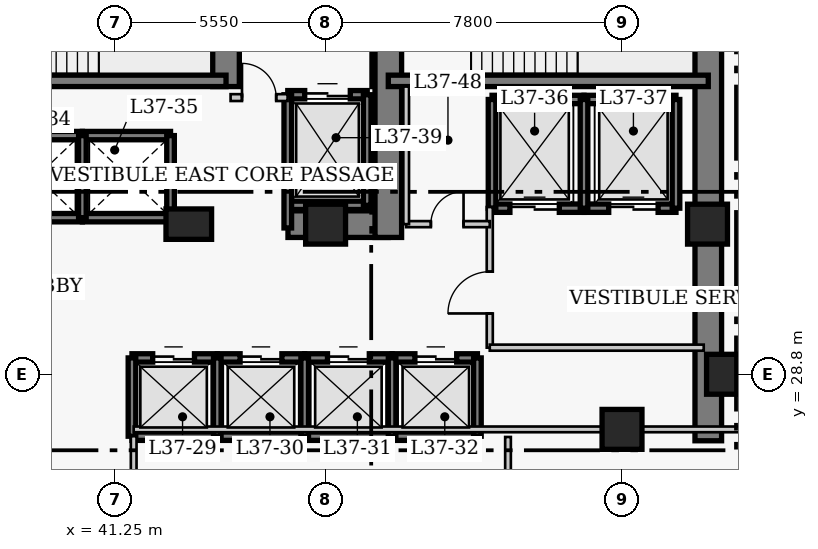
"""IFC4 building model, lengths in metres.
Left out: names, types, materials, properties, quantities, classifications, styles, units other than length and angle.
Written with IfcOpenShell. Run it as: python <this file> out.ifc"""

import sys

from ifc_helpers import new_model, si_unit, direction, frame, frame_2d, origin, origin_2d, place, context, subcontext, project, spatial, rectangle, extrude, element, fill, save


model = new_model("IFC4")
c1 = context("Model", 3, precision=1e-05, world=origin(), true_north=direction((0.0, 1.0)))
c2 = subcontext(c1, "Body", "Model", "MODEL_VIEW")
j1 = project(units=[si_unit("LENGTHUNIT", "METRE"), si_unit("PLANEANGLEUNIT", "RADIAN")], contexts=[c1])
p1 = place(None, origin())
s1 = spatial("IfcSite", under=j1, at=p1, CompositionType="ELEMENT")
p2 = place(p1, origin())
s2 = spatial("IfcBuilding", under=s1, at=p2, CompositionType="ELEMENT")
p3 = place(p2, frame((0.0, 0.0, 149.8)))
s3 = spatial("IfcBuildingStorey", under=s2, at=p3, CompositionType="ELEMENT", Elevation=149.8)
p4 = place(p3, frame((56.87, 27.05, 0.0), z_axis=(0.0, 0.0, 1.0), x_axis=(0.0, 1.0, 0.0)))
e1 = element("IfcWall", 1, at=p4, inside=s3, PredefinedType="SHEAR", context=c2, shape_type="SweptSolid", body=[
    extrude(rectangle(XDim=13.62, YDim=0.7, at=frame_2d((6.81, 0.0))), origin(), (0.0, 0.0, 1.0), 3.8),
])
p5 = place(p3, frame((45.81, 32.75, 0.0), z_axis=(0.0, 0.0, 1.0), x_axis=(1.0, 0.0, 0.0)))
e2 = element("IfcWall", 2, at=p5, inside=s3, PredefinedType="SHEAR", context=c2, shape_type="SweptSolid", body=[
    extrude(rectangle(XDim=2.64, YDim=0.7, at=frame_2d((1.32, 0.0))), origin(), (0.0, 0.0, 1.0), 3.8),
])
p6 = place(p3, frame((44.18, 36.37, 0.0), z_axis=(0.0, 0.0, 1.0), x_axis=(0.0, 1.0, 0.0)))
e3 = element("IfcWall", 3, at=p6, inside=s3, PredefinedType="SHEAR", context=c2, shape_type="SweptSolid", body=[
    extrude(rectangle(XDim=3.95, YDim=0.7, at=frame_2d((1.975, 0.0))), origin(), (0.0, 0.0, 1.0), 3.8),
])
p7 = place(p3, frame((48.45, 32.4, 0.0), z_axis=(0.0, 0.0, 1.0), x_axis=(0.0, 1.0, 0.0)))
e4 = element("IfcWall", 4, at=p7, inside=s3, PredefinedType="SHEAR", context=c2, shape_type="SweptSolid", body=[
    extrude(rectangle(XDim=7.92, YDim=0.7, at=frame_2d((3.96, 0.0))), origin(), (0.0, 0.0, 1.0), 3.8),
])
p8 = place(p7, frame((5.8, 0.0, 0.0)))
e5 = element("IfcOpeningElement", 5, at=p8, cuts=e4, PredefinedType="OPENING", context=c2, shape_type="SweptSolid", body=[
    extrude(rectangle(XDim=1.1, YDim=2.15, at=frame_2d((0.55, 1.075))), frame((0.0, 0.36, 0.0), z_axis=(0.0, -1.0, 0.0), x_axis=(1.0, 0.0, 0.0)), (0.0, 0.0, 1.0), 0.72),
])
p9 = place(p3, frame((35.85, 36.52, 0.0), z_axis=(0.0, 0.0, 1.0), x_axis=(1.0, 0.0, 0.0)))
e6 = element("IfcWall", 6, at=p9, inside=s3, PredefinedType="SHEAR", context=c2, shape_type="SweptSolid", body=[
    extrude(rectangle(XDim=8.33, YDim=0.3, at=frame_2d((4.165, 0.0))), origin(), (0.0, 0.0, 1.0), 3.8),
])
p10 = place(p3, frame((48.45, 36.52, 0.0), z_axis=(0.0, 0.0, 1.0), x_axis=(1.0, 0.0, 0.0)))
e7 = element("IfcWall", 7, at=p10, inside=s3, PredefinedType="SHEAR", context=c2, shape_type="SweptSolid", body=[
    extrude(rectangle(XDim=8.42, YDim=0.3, at=frame_2d((4.21, 0.0))), origin(), (0.0, 0.0, 1.0), 3.8),
])
p11 = place(p3, frame((57.35, 28.8, 0.0), z_axis=(0.0, 0.0, 1.0), x_axis=(1.0, 0.0, 0.0)))
e8 = element("IfcColumn", 8, at=p11, inside=s3, PredefinedType="COLUMN", context=c2, shape_type="SweptSolid", body=[
    extrude(rectangle(XDim=1.05, YDim=1.05, at=origin_2d()), origin(), (0.0, 0.0, 1.0), 3.8),
])
p12 = place(p3, frame((43.2, 32.75, 0.0), z_axis=(0.0, 0.0, 1.0), x_axis=(1.0, 0.0, 0.0)))
e9 = element("IfcColumn", 9, at=p12, inside=s3, PredefinedType="COLUMN", context=c2, shape_type="SweptSolid", body=[
    extrude(rectangle(XDim=1.2, YDim=0.8, at=origin_2d()), origin(), (0.0, 0.0, 1.0), 3.8),
])
for number, where, z_axis, x_axis in (
    (10, (46.8, 32.75, 0.0), (0.0, 0.0, 1.0), (1.0, 0.0, 0.0)),
    (11, (54.6, 27.35, 0.0), (0.0, 0.0, 1.0), (1.0, 0.0, 0.0)),
    (12, (56.85, 32.75, 0.0), (0.0, 0.0, 1.0), (1.0, 0.0, 0.0)),
):
    element("IfcColumn", number, at=place(p3, frame(where, z_axis=z_axis, x_axis=x_axis)), inside=s3, PredefinedType="COLUMN", context=c2, shape_type="SweptSolid", body=[
        extrude(rectangle(XDim=1.05, YDim=1.05, at=origin_2d()), origin(), (0.0, 0.0, 1.0), 3.8),
    ])
p13 = place(p3, frame((41.705, 29.23, 0.0), z_axis=(0.0, 0.0, 1.0), x_axis=(1.0, 0.0, 0.0)))
e13 = element("IfcWall", 13, at=p13, inside=s3, PredefinedType="SHEAR", context=c2, shape_type="SweptSolid", body=[
    extrude(rectangle(XDim=2.245, YDim=0.22, at=frame_2d((1.123, 0.0))), origin(), (0.0, 0.0, 1.0), 3.8),
])
p14 = place(p13, frame((0.545, 0.0, 0.0)))
e14 = element("IfcOpeningElement", 14, at=p14, cuts=e13, PredefinedType="OPENING", context=c2, shape_type="SweptSolid", body=[
    extrude(rectangle(XDim=1.1, YDim=2.15, at=frame_2d((0.55, 1.075))), frame((0.0, 0.12, 0.0), z_axis=(0.0, -1.0, 0.0), x_axis=(1.0, 0.0, 0.0)), (0.0, 0.0, 1.0), 0.24),
])
p15 = place(p3, frame((41.705, 27.17, 0.0), z_axis=(0.0, 0.0, 1.0), x_axis=(1.0, 0.0, 0.0)))
e15 = element("IfcWall", 15, at=p15, inside=s3, PredefinedType="SHEAR", context=c2, shape_type="SweptSolid", body=[
    extrude(rectangle(XDim=2.245, YDim=0.22, at=frame_2d((1.123, 0.0))), origin(), (0.0, 0.0, 1.0), 3.8),
])
p16 = place(p3, frame((41.705, 27.17, 0.0), z_axis=(0.0, 0.0, 1.0), x_axis=(0.0, 1.0, 0.0)))
e16 = element("IfcWall", 16, at=p16, inside=s3, PredefinedType="SHEAR", context=c2, shape_type="SweptSolid", body=[
    extrude(rectangle(XDim=2.06, YDim=0.2, at=frame_2d((1.03, 0.0))), origin(), (0.0, 0.0, 1.0), 3.8),
])
p17 = place(p3, frame((43.95, 29.23, 0.0), z_axis=(0.0, 0.0, 1.0), x_axis=(1.0, 0.0, 0.0)))
e17 = element("IfcWall", 17, at=p17, inside=s3, PredefinedType="SHEAR", context=c2, shape_type="SweptSolid", body=[
    extrude(rectangle(XDim=2.3, YDim=0.22, at=frame_2d((1.15, 0.0))), origin(), (0.0, 0.0, 1.0), 3.8),
])
p18 = place(p17, frame((0.6, 0.0, 0.0)))
e18 = element("IfcOpeningElement", 18, at=p18, cuts=e17, PredefinedType="OPENING", context=c2, shape_type="SweptSolid", body=[
    extrude(rectangle(XDim=1.1, YDim=2.15, at=frame_2d((0.55, 1.075))), frame((0.0, 0.12, 0.0), z_axis=(0.0, -1.0, 0.0), x_axis=(1.0, 0.0, 0.0)), (0.0, 0.0, 1.0), 0.24),
])
p19 = place(p3, frame((43.95, 27.17, 0.0), z_axis=(0.0, 0.0, 1.0), x_axis=(1.0, 0.0, 0.0)))
e19 = element("IfcWall", 19, at=p19, inside=s3, PredefinedType="SHEAR", context=c2, shape_type="SweptSolid", body=[
    extrude(rectangle(XDim=2.3, YDim=0.22, at=frame_2d((1.15, 0.0))), origin(), (0.0, 0.0, 1.0), 3.8),
])
p20 = place(p3, frame((43.95, 27.17, 0.0), z_axis=(0.0, 0.0, 1.0), x_axis=(0.0, 1.0, 0.0)))
e20 = element("IfcWall", 20, at=p20, inside=s3, PredefinedType="SHEAR", context=c2, shape_type="SweptSolid", body=[
    extrude(rectangle(XDim=2.06, YDim=0.2, at=frame_2d((1.03, 0.0))), origin(), (0.0, 0.0, 1.0), 3.8),
])
p21 = place(p3, frame((46.25, 29.23, 0.0), z_axis=(0.0, 0.0, 1.0), x_axis=(1.0, 0.0, 0.0)))
e21 = element("IfcWall", 21, at=p21, inside=s3, PredefinedType="SHEAR", context=c2, shape_type="SweptSolid", body=[
    extrude(rectangle(XDim=2.3, YDim=0.22, at=frame_2d((1.15, 0.0))), origin(), (0.0, 0.0, 1.0), 3.8),
])
p22 = place(p21, frame((0.6, 0.0, 0.0)))
e22 = element("IfcOpeningElement", 22, at=p22, cuts=e21, PredefinedType="OPENING", context=c2, shape_type="SweptSolid", body=[
    extrude(rectangle(XDim=1.1, YDim=2.15, at=frame_2d((0.55, 1.075))), frame((0.0, 0.12, 0.0), z_axis=(0.0, -1.0, 0.0), x_axis=(1.0, 0.0, 0.0)), (0.0, 0.0, 1.0), 0.24),
])
p23 = place(p3, frame((46.25, 27.17, 0.0), z_axis=(0.0, 0.0, 1.0), x_axis=(1.0, 0.0, 0.0)))
e23 = element("IfcWall", 23, at=p23, inside=s3, PredefinedType="SHEAR", context=c2, shape_type="SweptSolid", body=[
    extrude(rectangle(XDim=2.3, YDim=0.22, at=frame_2d((1.15, 0.0))), origin(), (0.0, 0.0, 1.0), 3.8),
])
p24 = place(p3, frame((46.25, 27.17, 0.0), z_axis=(0.0, 0.0, 1.0), x_axis=(0.0, 1.0, 0.0)))
e24 = element("IfcWall", 24, at=p24, inside=s3, PredefinedType="SHEAR", context=c2, shape_type="SweptSolid", body=[
    extrude(rectangle(XDim=2.06, YDim=0.2, at=frame_2d((1.03, 0.0))), origin(), (0.0, 0.0, 1.0), 3.8),
])
p25 = place(p3, frame((48.55, 29.23, 0.0), z_axis=(0.0, 0.0, 1.0), x_axis=(1.0, 0.0, 0.0)))
e25 = element("IfcWall", 25, at=p25, inside=s3, PredefinedType="SHEAR", context=c2, shape_type="SweptSolid", body=[
    extrude(rectangle(XDim=2.245, YDim=0.22, at=frame_2d((1.123, 0.0))), origin(), (0.0, 0.0, 1.0), 3.8),
])
p26 = place(p25, frame((0.6, 0.0, 0.0)))
e26 = element("IfcOpeningElement", 26, at=p26, cuts=e25, PredefinedType="OPENING", context=c2, shape_type="SweptSolid", body=[
    extrude(rectangle(XDim=1.1, YDim=2.15, at=frame_2d((0.55, 1.075))), frame((0.0, 0.12, 0.0), z_axis=(0.0, -1.0, 0.0), x_axis=(1.0, 0.0, 0.0)), (0.0, 0.0, 1.0), 0.24),
])
p27 = place(p3, frame((48.55, 27.17, 0.0), z_axis=(0.0, 0.0, 1.0), x_axis=(1.0, 0.0, 0.0)))
e27 = element("IfcWall", 27, at=p27, inside=s3, PredefinedType="SHEAR", context=c2, shape_type="SweptSolid", body=[
    extrude(rectangle(XDim=2.245, YDim=0.22, at=frame_2d((1.123, 0.0))), origin(), (0.0, 0.0, 1.0), 3.8),
])
for number, where, z_axis, x_axis in (
    (28, (48.55, 27.17, 0.0), (0.0, 0.0, 1.0), (0.0, 1.0, 0.0)),
    (29, (50.795, 27.17, 0.0), (0.0, 0.0, 1.0), (0.0, 1.0, 0.0)),
):
    element("IfcWall", number, at=place(p3, frame(where, z_axis=z_axis, x_axis=x_axis)), inside=s3, PredefinedType="SHEAR", context=c2, shape_type="SweptSolid", body=[
        extrude(rectangle(XDim=2.06, YDim=0.2, at=frame_2d((1.03, 0.0))), origin(), (0.0, 0.0, 1.0), 3.8),
    ])
for number, where, z_axis, x_axis in (
    (30, (38.0, 35.08, 0.0), (0.0, 0.0, 1.0), (1.0, 0.0, 0.0)),
    (31, (38.0, 32.92, 0.0), (0.0, 0.0, 1.0), (1.0, 0.0, 0.0)),
):
    element("IfcWall", number, at=place(p3, frame(where, z_axis=z_axis, x_axis=x_axis)), inside=s3, PredefinedType="SHEAR", context=c2, shape_type="SweptSolid", body=[
        extrude(rectangle(XDim=2.4, YDim=0.22, at=frame_2d((1.2, 0.0))), origin(), (0.0, 0.0, 1.0), 3.8),
    ])
for number, where, z_axis, x_axis in (
    (32, (40.4, 35.08, 0.0), (0.0, 0.0, 1.0), (1.0, 0.0, 0.0)),
    (33, (40.4, 32.92, 0.0), (0.0, 0.0, 1.0), (1.0, 0.0, 0.0)),
):
    element("IfcWall", number, at=place(p3, frame(where, z_axis=z_axis, x_axis=x_axis)), inside=s3, PredefinedType="SHEAR", context=c2, shape_type="SweptSolid", body=[
        extrude(rectangle(XDim=2.32, YDim=0.22, at=frame_2d((1.16, 0.0))), origin(), (0.0, 0.0, 1.0), 3.8),
    ])
for number, where, z_axis, x_axis in (
    (34, (40.4, 32.92, 0.0), (0.0, 0.0, 1.0), (0.0, 1.0, 0.0)),
    (35, (42.72, 32.92, 0.0), (0.0, 0.0, 1.0), (0.0, 1.0, 0.0)),
):
    element("IfcWall", number, at=place(p3, frame(where, z_axis=z_axis, x_axis=x_axis)), inside=s3, PredefinedType="SHEAR", context=c2, shape_type="SweptSolid", body=[
        extrude(rectangle(XDim=2.16, YDim=0.2, at=frame_2d((1.08, 0.0))), origin(), (0.0, 0.0, 1.0), 3.8),
    ])
p28 = place(p3, frame((51.18, 36.03, 0.0), z_axis=(0.0, 0.0, 1.0), x_axis=(1.0, 0.0, 0.0)))
e36 = element("IfcWall", 36, at=p28, inside=s3, PredefinedType="SHEAR", context=c2, shape_type="SweptSolid", body=[
    extrude(rectangle(XDim=2.42, YDim=0.22, at=frame_2d((1.21, 0.0))), origin(), (0.0, 0.0, 1.0), 3.8),
])
p29 = place(p3, frame((51.18, 33.17, 0.0), z_axis=(0.0, 0.0, 1.0), x_axis=(1.0, 0.0, 0.0)))
e37 = element("IfcWall", 37, at=p29, inside=s3, PredefinedType="SHEAR", context=c2, shape_type="SweptSolid", body=[
    extrude(rectangle(XDim=2.42, YDim=0.22, at=frame_2d((1.21, 0.0))), origin(), (0.0, 0.0, 1.0), 3.8),
])
p30 = place(p29, frame((0.47, 0.0, 0.0)))
e38 = element("IfcOpeningElement", 38, at=p30, cuts=e37, PredefinedType="OPENING", context=c2, shape_type="SweptSolid", body=[
    extrude(rectangle(XDim=1.3, YDim=2.15, at=frame_2d((0.65, 1.075))), frame((0.0, 0.12, 0.0), z_axis=(0.0, -1.0, 0.0), x_axis=(1.0, 0.0, 0.0)), (0.0, 0.0, 1.0), 0.24),
])
p31 = place(p3, frame((51.18, 33.17, 0.0), z_axis=(0.0, 0.0, 1.0), x_axis=(0.0, 1.0, 0.0)))
e39 = element("IfcWall", 39, at=p31, inside=s3, PredefinedType="SHEAR", context=c2, shape_type="SweptSolid", body=[
    extrude(rectangle(XDim=2.86, YDim=0.2, at=frame_2d((1.43, 0.0))), origin(), (0.0, 0.0, 1.0), 3.8),
])
p32 = place(p3, frame((53.6, 36.03, 0.0), z_axis=(0.0, 0.0, 1.0), x_axis=(1.0, 0.0, 0.0)))
e40 = element("IfcWall", 40, at=p32, inside=s3, PredefinedType="SHEAR", context=c2, shape_type="SweptSolid", body=[
    extrude(rectangle(XDim=2.42, YDim=0.22, at=frame_2d((1.21, 0.0))), origin(), (0.0, 0.0, 1.0), 3.8),
])
p33 = place(p3, frame((53.6, 33.17, 0.0), z_axis=(0.0, 0.0, 1.0), x_axis=(1.0, 0.0, 0.0)))
e41 = element("IfcWall", 41, at=p33, inside=s3, PredefinedType="SHEAR", context=c2, shape_type="SweptSolid", body=[
    extrude(rectangle(XDim=2.42, YDim=0.22, at=frame_2d((1.21, 0.0))), origin(), (0.0, 0.0, 1.0), 3.8),
])
p34 = place(p33, frame((0.65, 0.0, 0.0)))
e42 = element("IfcOpeningElement", 42, at=p34, cuts=e41, PredefinedType="OPENING", context=c2, shape_type="SweptSolid", body=[
    extrude(rectangle(XDim=1.3, YDim=2.15, at=frame_2d((0.65, 1.075))), frame((0.0, 0.12, 0.0), z_axis=(0.0, -1.0, 0.0), x_axis=(1.0, 0.0, 0.0)), (0.0, 0.0, 1.0), 0.24),
])
for number, where, z_axis, x_axis in (
    (43, (53.6, 33.17, 0.0), (0.0, 0.0, 1.0), (0.0, 1.0, 0.0)),
    (44, (56.02, 33.17, 0.0), (0.0, 0.0, 1.0), (0.0, 1.0, 0.0)),
):
    element("IfcWall", number, at=place(p3, frame(where, z_axis=z_axis, x_axis=x_axis)), inside=s3, PredefinedType="SHEAR", context=c2, shape_type="SweptSolid", body=[
        extrude(rectangle(XDim=2.86, YDim=0.2, at=frame_2d((1.43, 0.0))), origin(), (0.0, 0.0, 1.0), 3.8),
    ])
p35 = place(p3, frame((45.805, 36.155, 0.0), z_axis=(0.0, 0.0, 1.0), x_axis=(1.0, 0.0, 0.0)))
e45 = element("IfcWall", 45, at=p35, inside=s3, PredefinedType="SHEAR", context=c2, shape_type="SweptSolid", body=[
    extrude(rectangle(XDim=2.09, YDim=0.22, at=frame_2d((1.045, 0.0))), origin(), (0.0, 0.0, 1.0), 3.8),
])
p36 = place(p35, frame((0.445, 0.0, 0.0)))
e46 = element("IfcOpeningElement", 46, at=p36, cuts=e45, PredefinedType="OPENING", context=c2, shape_type="SweptSolid", body=[
    extrude(rectangle(XDim=1.2, YDim=2.15, at=frame_2d((0.6, 1.075))), frame((0.0, 0.12, 0.0), z_axis=(0.0, -1.0, 0.0), x_axis=(1.0, 0.0, 0.0)), (0.0, 0.0, 1.0), 0.24),
])
p37 = place(p3, frame((45.805, 33.245, 0.0), z_axis=(0.0, 0.0, 1.0), x_axis=(1.0, 0.0, 0.0)))
e47 = element("IfcWall", 47, at=p37, inside=s3, PredefinedType="SHEAR", context=c2, shape_type="SweptSolid", body=[
    extrude(rectangle(XDim=2.09, YDim=0.22, at=frame_2d((1.045, 0.0))), origin(), (0.0, 0.0, 1.0), 3.8),
])
p38 = place(p3, frame((45.805, 32.65, 0.0), z_axis=(0.0, 0.0, 1.0), x_axis=(0.0, 1.0, 0.0)))
e48 = element("IfcWall", 48, at=p38, inside=s3, PredefinedType="SHEAR", context=c2, shape_type="SweptSolid", body=[
    extrude(rectangle(XDim=3.505, YDim=0.2, at=frame_2d((1.752, 0.0))), origin(), (0.0, 0.0, 1.0), 3.8),
])
p39 = place(p3, frame((47.895, 33.245, 0.0), z_axis=(0.0, 0.0, 1.0), x_axis=(0.0, 1.0, 0.0)))
e49 = element("IfcWall", 49, at=p39, inside=s3, PredefinedType="SHEAR", context=c2, shape_type="SweptSolid", body=[
    extrude(rectangle(XDim=2.91, YDim=0.2, at=frame_2d((1.455, 0.0))), origin(), (0.0, 0.0, 1.0), 3.8),
])
p40 = place(p3, frame((44.3, 36.08, 0.0), z_axis=(0.0, 0.0, 1.0), x_axis=(1.0, 0.0, 0.0)))
e50 = element("IfcWall", 50, at=p40, inside=s3, PredefinedType="PARTITIONING", context=c2, shape_type="SweptSolid", body=[
    extrude(rectangle(XDim=1.5, YDim=0.18, at=frame_2d((0.75, 0.0))), origin(), (0.0, 0.0, 1.0), 3.55),
])
p41 = place(p40, frame((0.3, 0.0, 0.0)))
e51 = element("IfcOpeningElement", 51, at=p41, cuts=e50, PredefinedType="OPENING", context=c2, shape_type="SweptSolid", body=[
    extrude(rectangle(XDim=0.9, YDim=2.15, at=frame_2d((0.45, 1.075))), frame((0.0, 0.1, 0.0), z_axis=(0.0, -1.0, 0.0), x_axis=(1.0, 0.0, 0.0)), (0.0, 0.0, 1.0), 0.2),
])
p42 = place(p3, frame((51.12, 29.5, 0.0), z_axis=(0.0, 0.0, 1.0), x_axis=(0.0, 1.0, 0.0)))
e52 = element("IfcWall", 52, at=p42, inside=s3, PredefinedType="PARTITIONING", context=c2, shape_type="SweptSolid", body=[
    extrude(rectangle(XDim=3.7, YDim=0.16, at=frame_2d((1.85, 0.0))), origin(), (0.0, 0.0, 1.0), 3.55),
])
p43 = place(p42, frame((0.9, 0.0, 0.0)))
e53 = element("IfcOpeningElement", 53, at=p43, cuts=e52, PredefinedType="OPENING", context=c2, shape_type="SweptSolid", body=[
    extrude(rectangle(XDim=1.1, YDim=2.15, at=frame_2d((0.55, 1.075))), frame((0.0, 0.09, 0.0), z_axis=(0.0, -1.0, 0.0), x_axis=(1.0, 0.0, 0.0)), (0.0, 0.0, 1.0), 0.18),
])
p44 = place(p3, frame((51.12, 29.5, 0.0), z_axis=(0.0, 0.0, 1.0), x_axis=(1.0, 0.0, 0.0)))
e54 = element("IfcWall", 54, at=p44, inside=s3, PredefinedType="PARTITIONING", context=c2, shape_type="SweptSolid", body=[
    extrude(rectangle(XDim=5.63, YDim=0.16, at=frame_2d((2.815, 0.0))), origin(), (0.0, 0.0, 1.0), 3.55),
])
p45 = place(p3, frame((48.92, 32.75, 0.0), z_axis=(0.0, 0.0, 1.0), x_axis=(1.0, 0.0, 0.0)))
e55 = element("IfcWall", 55, at=p45, inside=s3, PredefinedType="PARTITIONING", context=c2, shape_type="SweptSolid", body=[
    extrude(rectangle(XDim=2.2, YDim=0.16, at=frame_2d((1.1, 0.0))), origin(), (0.0, 0.0, 1.0), 3.55),
])
p46 = place(p45, frame((0.65, 0.0, 0.0)))
e56 = element("IfcOpeningElement", 56, at=p46, cuts=e55, PredefinedType="OPENING", context=c2, shape_type="SweptSolid", body=[
    extrude(rectangle(XDim=0.86, YDim=2.05, at=frame_2d((0.43, 1.025))), frame((0.0, 0.09, 0.0), z_axis=(0.0, -1.0, 0.0), x_axis=(1.0, 0.0, 0.0)), (0.0, 0.0, 1.0), 0.18),
])
p47 = place(p3, frame((48.92, 32.75, 0.0), z_axis=(0.0, 0.0, 1.0), x_axis=(0.0, 1.0, 0.0)))
e57 = element("IfcWall", 57, at=p47, inside=s3, PredefinedType="PARTITIONING", context=c2, shape_type="SweptSolid", body=[
    extrude(rectangle(XDim=3.62, YDim=0.15, at=frame_2d((1.81, 0.0))), origin(), (0.0, 0.0, 1.0), 3.55),
])
p48 = place(p3, frame((41.75, 17.96, 0.0), z_axis=(0.0, 0.0, 1.0), x_axis=(0.0, 1.0, 0.0)))
e58 = element("IfcWall", 58, at=p48, inside=s3, PredefinedType="PARTITIONING", context=c2, shape_type="SweptSolid", body=[
    extrude(rectangle(XDim=9.21, YDim=0.15, at=frame_2d((4.605, 0.0))), origin(), (0.0, 0.0, 1.0), 3.55),
])
p49 = place(p3, frame((51.6, 17.96, 0.0), z_axis=(0.0, 0.0, 1.0), x_axis=(0.0, 1.0, 0.0)))
e59 = element("IfcWall", 59, at=p49, inside=s3, PredefinedType="PARTITIONING", context=c2, shape_type="SweptSolid", body=[
    extrude(rectangle(XDim=9.19, YDim=0.15, at=frame_2d((4.595, 0.0))), origin(), (0.0, 0.0, 1.0), 3.55),
])
p50 = place(p3, frame((41.75, 27.35, 0.0), z_axis=(0.0, 0.0, 1.0), x_axis=(1.0, 0.0, 0.0)))
e60 = element("IfcWall", 60, at=p50, inside=s3, PredefinedType="PARTITIONING", context=c2, shape_type="SweptSolid", body=[
    extrude(rectangle(XDim=17.49, YDim=0.15, at=frame_2d((8.745, 0.0))), origin(), (0.0, 0.0, 1.0), 3.55),
])
p51 = place(p14, origin())
e61 = element("IfcDoor", 61, at=p51, inside=s3, OperationType="DOUBLE_DOOR_SLIDING", PredefinedType="DOOR", context=c2, shape_type="SweptSolid", body=[
    extrude(rectangle(XDim=1.1, YDim=2.15, at=frame_2d((0.55, 1.075))), frame((0.0, 0.025, 0.0), z_axis=(0.0, -1.0, 0.0), x_axis=(1.0, 0.0, 0.0)), (0.0, 0.0, 1.0), 0.05),
])
fill(e14, e61)
p52 = place(p18, origin())
e62 = element("IfcDoor", 62, at=p52, inside=s3, OperationType="DOUBLE_DOOR_SLIDING", PredefinedType="DOOR", context=c2, shape_type="SweptSolid", body=[
    extrude(rectangle(XDim=1.1, YDim=2.15, at=frame_2d((0.55, 1.075))), frame((0.0, 0.025, 0.0), z_axis=(0.0, -1.0, 0.0), x_axis=(1.0, 0.0, 0.0)), (0.0, 0.0, 1.0), 0.05),
])
fill(e18, e62)
p53 = place(p22, origin())
e63 = element("IfcDoor", 63, at=p53, inside=s3, OperationType="DOUBLE_DOOR_SLIDING", PredefinedType="DOOR", context=c2, shape_type="SweptSolid", body=[
    extrude(rectangle(XDim=1.1, YDim=2.15, at=frame_2d((0.55, 1.075))), frame((0.0, 0.025, 0.0), z_axis=(0.0, -1.0, 0.0), x_axis=(1.0, 0.0, 0.0)), (0.0, 0.0, 1.0), 0.05),
])
fill(e22, e63)
p54 = place(p26, origin())
e64 = element("IfcDoor", 64, at=p54, inside=s3, OperationType="DOUBLE_DOOR_SLIDING", PredefinedType="DOOR", context=c2, shape_type="SweptSolid", body=[
    extrude(rectangle(XDim=1.1, YDim=2.15, at=frame_2d((0.55, 1.075))), frame((0.0, 0.025, 0.0), z_axis=(0.0, -1.0, 0.0), x_axis=(1.0, 0.0, 0.0)), (0.0, 0.0, 1.0), 0.05),
])
fill(e26, e64)
p55 = place(p30, origin())
e65 = element("IfcDoor", 65, at=p55, inside=s3, OperationType="DOUBLE_DOOR_SLIDING", PredefinedType="DOOR", context=c2, shape_type="SweptSolid", body=[
    extrude(rectangle(XDim=1.3, YDim=2.15, at=frame_2d((0.65, 1.075))), frame((0.0, 0.025, 0.0), z_axis=(0.0, -1.0, 0.0), x_axis=(1.0, 0.0, 0.0)), (0.0, 0.0, 1.0), 0.05),
])
fill(e38, e65)
p56 = place(p34, origin())
e66 = element("IfcDoor", 66, at=p56, inside=s3, OperationType="DOUBLE_DOOR_SLIDING", PredefinedType="DOOR", context=c2, shape_type="SweptSolid", body=[
    extrude(rectangle(XDim=1.3, YDim=2.15, at=frame_2d((0.65, 1.075))), frame((0.0, 0.025, 0.0), z_axis=(0.0, -1.0, 0.0), x_axis=(1.0, 0.0, 0.0)), (0.0, 0.0, 1.0), 0.05),
])
fill(e42, e66)
p57 = place(p36, origin())
e67 = element("IfcDoor", 67, at=p57, inside=s3, OperationType="DOUBLE_DOOR_SLIDING", PredefinedType="DOOR", context=c2, shape_type="SweptSolid", body=[
    extrude(rectangle(XDim=1.2, YDim=2.15, at=frame_2d((0.6, 1.075))), frame((0.0, 0.025, 0.0), z_axis=(0.0, -1.0, 0.0), x_axis=(1.0, 0.0, 0.0)), (0.0, 0.0, 1.0), 0.05),
])
fill(e46, e67)
p58 = place(p41, origin())
e68 = element("IfcDoor", 68, at=p58, inside=s3, OperationType="SINGLE_SWING_LEFT", PredefinedType="DOOR", context=c2, shape_type="SweptSolid", body=[
    extrude(rectangle(XDim=0.9, YDim=2.15, at=frame_2d((0.45, 1.075))), frame((0.0, 0.025, 0.0), z_axis=(0.0, -1.0, 0.0), x_axis=(1.0, 0.0, 0.0)), (0.0, 0.0, 1.0), 0.05),
])
fill(e51, e68)
p59 = place(p43, origin())
e69 = element("IfcDoor", 69, at=p59, inside=s3, OperationType="SINGLE_SWING_LEFT", PredefinedType="DOOR", context=c2, shape_type="SweptSolid", body=[
    extrude(rectangle(XDim=1.1, YDim=2.15, at=frame_2d((0.55, 1.075))), frame((0.0, 0.025, 0.0), z_axis=(0.0, -1.0, 0.0), x_axis=(1.0, 0.0, 0.0)), (0.0, 0.0, 1.0), 0.05),
])
fill(e53, e69)
p60 = place(p46, origin())
e70 = element("IfcDoor", 70, at=p60, inside=s3, OperationType="SINGLE_SWING_RIGHT", PredefinedType="DOOR", context=c2, shape_type="SweptSolid", body=[
    extrude(rectangle(XDim=0.86, YDim=2.05, at=frame_2d((0.43, 1.025))), frame((0.0, 0.025, 0.0), z_axis=(0.0, -1.0, 0.0), x_axis=(1.0, 0.0, 0.0)), (0.0, 0.0, 1.0), 0.05),
])
fill(e56, e70)
save(model, sys.argv[1])
